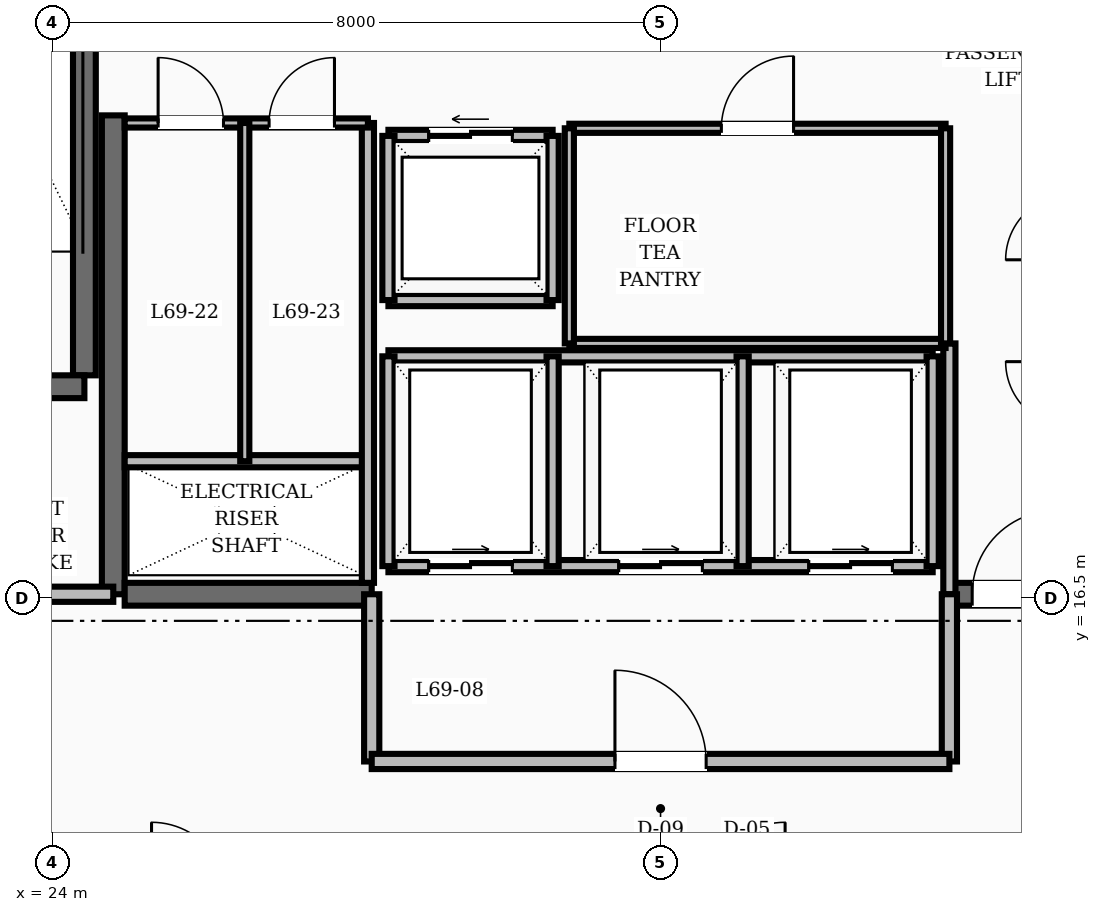
"""IFC4 building model, lengths in metres.
Left out: names, types, materials, properties, quantities, classifications, styles, units other than length and angle.
Written with IfcOpenShell. Run it as: python <this file> out.ifc"""

import sys

from ifc_helpers import new_model, si_unit, direction, frame, frame_2d, origin, place, context, subcontext, project, spatial, rectangle, extrude, element, fill, save


model = new_model("IFC4")
c1 = context("Model", 3, precision=1e-05, world=origin(), true_north=direction((0.0, 1.0)))
c2 = subcontext(c1, "Body", "Model", "MODEL_VIEW")
j1 = project(units=[si_unit("LENGTHUNIT", "METRE"), si_unit("PLANEANGLEUNIT", "RADIAN")], contexts=[c1])
p1 = place(None, origin())
s1 = spatial("IfcSite", under=j1, at=p1, CompositionType="ELEMENT")
p2 = place(p1, origin())
s2 = spatial("IfcBuilding", under=s1, at=p2, CompositionType="ELEMENT")
p3 = place(p2, frame((0.0, 0.0, 265.2)))
s3 = spatial("IfcBuildingStorey", under=s2, at=p3, CompositionType="ELEMENT", Elevation=265.2)
p4 = place(p3, frame((24.8, 16.55, 0.0), z_axis=(0.0, 0.0, 1.0), x_axis=(0.0, 1.0, 0.0)))
e1 = element("IfcWall", 1, at=p4, inside=s3, PredefinedType="SHEAR", context=c2, shape_type="SweptSolid", body=[
    extrude(rectangle(XDim=6.3, YDim=0.3, at=frame_2d((3.15, 0.0))), origin(), (0.0, 0.0, 1.0), 3.6),
])
p5 = place(p3, frame((24.95, 16.55, 0.0), z_axis=(0.0, 0.0, 1.0), x_axis=(1.0, 0.0, 0.0)))
e2 = element("IfcWall", 2, at=p5, inside=s3, PredefinedType="SHEAR", context=c2, shape_type="SweptSolid", body=[
    extrude(rectangle(XDim=3.25, YDim=0.3, at=frame_2d((1.625, 0.0))), origin(), (0.0, 0.0, 1.0), 3.6),
])
p6 = place(p3, frame((35.8, 16.55, 0.0), z_axis=(0.0, 0.0, 1.0), x_axis=(1.0, 0.0, 0.0)))
e3 = element("IfcWall", 3, at=p6, inside=s3, PredefinedType="SHEAR", context=c2, shape_type="SweptSolid", body=[
    extrude(rectangle(XDim=3.25, YDim=0.3, at=frame_2d((1.625, 0.0))), origin(), (0.0, 0.0, 1.0), 3.6),
])
p7 = place(p6, frame((0.3, 0.0, 0.0)))
e4 = element("IfcOpeningElement", 4, at=p7, cuts=e3, PredefinedType="OPENING", context=c2, shape_type="SweptSolid", body=[
    extrude(rectangle(XDim=1.1, YDim=2.1, at=frame_2d((0.55, 1.05))), frame((0.0, 0.16, 0.0), z_axis=(0.0, -1.0, 0.0), x_axis=(1.0, 0.0, 0.0)), (0.0, 0.0, 1.0), 0.32),
])
p8 = place(p3, frame((24.42, 19.43, 0.0), z_axis=(0.0, 0.0, 1.0), x_axis=(0.0, 1.0, 0.0)))
e5 = element("IfcWall", 5, at=p8, inside=s3, PredefinedType="SHEAR", context=c2, shape_type="SweptSolid", body=[
    extrude(rectangle(XDim=8.74, YDim=0.3, at=frame_2d((4.37, 0.0))), origin(), (0.0, 0.0, 1.0), 3.6),
])
p9 = place(p3, frame((20.82, 19.28, 0.0), z_axis=(0.0, 0.0, 1.0), x_axis=(1.0, 0.0, 0.0)))
e6 = element("IfcWall", 6, at=p9, inside=s3, PredefinedType="SHEAR", context=c2, shape_type="SweptSolid", body=[
    extrude(rectangle(XDim=3.6, YDim=0.3, at=frame_2d((1.8, 0.0))), origin(), (0.0, 0.0, 1.0), 3.6),
])
p10 = place(p9, frame((1.3, 0.0, 0.0)))
e7 = element("IfcOpeningElement", 7, at=p10, cuts=e6, PredefinedType="OPENING", context=c2, shape_type="SweptSolid", body=[
    extrude(rectangle(XDim=1.1, YDim=2.1, at=frame_2d((0.55, 1.05))), frame((0.0, 0.16, 0.0), z_axis=(0.0, -1.0, 0.0), x_axis=(1.0, 0.0, 0.0)), (0.0, 0.0, 1.0), 0.32),
])
p11 = place(p3, frame((20.82, 16.55, 0.0), z_axis=(0.0, 0.0, 1.0), x_axis=(1.0, 0.0, 0.0)))
e8 = element("IfcWall", 8, at=p11, inside=s3, PredefinedType="SOLIDWALL", context=c2, shape_type="SweptSolid", body=[
    extrude(rectangle(XDim=3.98, YDim=0.2, at=frame_2d((1.99, 0.0))), origin(), (0.0, 0.0, 1.0), 2.87),
])
p12 = place(p3, frame((35.8, 16.55, 0.0), z_axis=(0.0, 0.0, 1.0), x_axis=(0.0, 1.0, 0.0)))
e9 = element("IfcWall", 9, at=p12, inside=s3, PredefinedType="SOLIDWALL", context=c2, shape_type="SweptSolid", body=[
    extrude(rectangle(XDim=3.3, YDim=0.16, at=frame_2d((1.65, 0.0))), origin(), (0.0, 0.0, 1.0), 2.87),
])
for number, where, z_axis, x_axis in (
    (10, (28.2, 14.35, 0.0), (0.0, 0.0, 1.0), (0.0, 1.0, 0.0)),
    (11, (35.8, 14.35, 0.0), (0.0, 0.0, 1.0), (0.0, 1.0, 0.0)),
):
    element("IfcWall", number, at=place(p3, frame(where, z_axis=z_axis, x_axis=x_axis)), inside=s3, PredefinedType="SOLIDWALL", context=c2, shape_type="SweptSolid", body=[
        extrude(rectangle(XDim=2.2, YDim=0.2, at=frame_2d((1.1, 0.0))), origin(), (0.0, 0.0, 1.0), 2.87),
    ])
p13 = place(p3, frame((28.2, 14.35, 0.0), z_axis=(0.0, 0.0, 1.0), x_axis=(1.0, 0.0, 0.0)))
e12 = element("IfcWall", 12, at=p13, inside=s3, PredefinedType="SOLIDWALL", context=c2, shape_type="SweptSolid", body=[
    extrude(rectangle(XDim=7.6, YDim=0.2, at=frame_2d((3.8, 0.0))), origin(), (0.0, 0.0, 1.0), 2.87),
])
p14 = place(p13, frame((3.2, 0.0, 0.0)))
e13 = element("IfcOpeningElement", 13, at=p14, cuts=e12, PredefinedType="OPENING", context=c2, shape_type="SweptSolid", body=[
    extrude(rectangle(XDim=1.2, YDim=2.1, at=frame_2d((0.6, 1.05))), frame((0.0, 0.11, 0.0), z_axis=(0.0, -1.0, 0.0), x_axis=(1.0, 0.0, 0.0)), (0.0, 0.0, 1.0), 0.22),
])
p15 = place(p3, frame((28.42, 22.58, 0.0), z_axis=(0.0, 0.0, 1.0), x_axis=(1.0, 0.0, 0.0)))
e14 = element("IfcWall", 14, at=p15, inside=s3, PredefinedType="SOLIDWALL", context=c2, shape_type="SweptSolid", body=[
    extrude(rectangle(XDim=2.16, YDim=0.16, at=frame_2d((1.08, 0.0))), origin(), (0.0, 0.0, 1.0), 2.87),
])
p16 = place(p15, frame((0.53, 0.0, 0.0)))
e15 = element("IfcOpeningElement", 15, at=p16, cuts=e14, PredefinedType="OPENING", context=c2, shape_type="SweptSolid", body=[
    extrude(rectangle(XDim=1.1, YDim=2.15, at=frame_2d((0.55, 1.075))), frame((0.0, 0.09, 0.0), z_axis=(0.0, -1.0, 0.0), x_axis=(1.0, 0.0, 0.0)), (0.0, 0.0, 1.0), 0.18),
])
for number, where, z_axis, x_axis in (
    (16, (28.42, 20.42, 0.0), (0.0, 0.0, 1.0), (1.0, 0.0, 0.0)),
    (17, (28.42, 20.42, 0.0), (0.0, 0.0, 1.0), (0.0, 1.0, 0.0)),
    (18, (30.58, 20.42, 0.0), (0.0, 0.0, 1.0), (0.0, 1.0, 0.0)),
):
    element("IfcWall", number, at=place(p3, frame(where, z_axis=z_axis, x_axis=x_axis)), inside=s3, PredefinedType="SOLIDWALL", context=c2, shape_type="SweptSolid", body=[
        extrude(rectangle(XDim=2.16, YDim=0.16, at=frame_2d((1.08, 0.0))), origin(), (0.0, 0.0, 1.0), 2.87),
    ])
p17 = place(p3, frame((28.42, 16.92, 0.0), z_axis=(0.0, 0.0, 1.0), x_axis=(1.0, 0.0, 0.0)))
e19 = element("IfcWall", 19, at=p17, inside=s3, PredefinedType="SOLIDWALL", context=c2, shape_type="SweptSolid", body=[
    extrude(rectangle(XDim=7.16, YDim=0.16, at=frame_2d((3.58, 0.0))), origin(), (0.0, 0.0, 1.0), 2.87),
])
p18 = place(p17, frame((0.53, 0.0, 0.0)))
e20 = element("IfcOpeningElement", 20, at=p18, cuts=e19, PredefinedType="OPENING", context=c2, shape_type="SweptSolid", body=[
    extrude(rectangle(XDim=1.1, YDim=2.15, at=frame_2d((0.55, 1.075))), frame((0.0, 0.09, 0.0), z_axis=(0.0, -1.0, 0.0), x_axis=(1.0, 0.0, 0.0)), (0.0, 0.0, 1.0), 0.18),
])
p19 = place(p17, frame((3.03, 0.0, 0.0)))
e21 = element("IfcOpeningElement", 21, at=p19, cuts=e19, PredefinedType="OPENING", context=c2, shape_type="SweptSolid", body=[
    extrude(rectangle(XDim=1.1, YDim=2.15, at=frame_2d((0.55, 1.075))), frame((0.0, 0.09, 0.0), z_axis=(0.0, -1.0, 0.0), x_axis=(1.0, 0.0, 0.0)), (0.0, 0.0, 1.0), 0.18),
])
p20 = place(p17, frame((5.53, 0.0, 0.0)))
e22 = element("IfcOpeningElement", 22, at=p20, cuts=e19, PredefinedType="OPENING", context=c2, shape_type="SweptSolid", body=[
    extrude(rectangle(XDim=1.1, YDim=2.15, at=frame_2d((0.55, 1.075))), frame((0.0, 0.09, 0.0), z_axis=(0.0, -1.0, 0.0), x_axis=(1.0, 0.0, 0.0)), (0.0, 0.0, 1.0), 0.18),
])
p21 = place(p3, frame((28.42, 19.68, 0.0), z_axis=(0.0, 0.0, 1.0), x_axis=(1.0, 0.0, 0.0)))
e23 = element("IfcWall", 23, at=p21, inside=s3, PredefinedType="SOLIDWALL", context=c2, shape_type="SweptSolid", body=[
    extrude(rectangle(XDim=7.16, YDim=0.16, at=frame_2d((3.58, 0.0))), origin(), (0.0, 0.0, 1.0), 2.87),
])
for number, where, z_axis, x_axis in (
    (24, (28.42, 16.92, 0.0), (0.0, 0.0, 1.0), (0.0, 1.0, 0.0)),
    (25, (30.58, 16.92, 0.0), (0.0, 0.0, 1.0), (0.0, 1.0, 0.0)),
    (26, (33.08, 16.92, 0.0), (0.0, 0.0, 1.0), (0.0, 1.0, 0.0)),
    (27, (35.58, 16.92, 0.0), (0.0, 0.0, 1.0), (0.0, 1.0, 0.0)),
):
    element("IfcWall", number, at=place(p3, frame(where, z_axis=z_axis, x_axis=x_axis)), inside=s3, PredefinedType="SOLIDWALL", context=c2, shape_type="SweptSolid", body=[
        extrude(rectangle(XDim=2.76, YDim=0.16, at=frame_2d((1.38, 0.0))), origin(), (0.0, 0.0, 1.0), 2.87),
    ])
p22 = place(p3, frame((30.8, 22.68, 0.0), z_axis=(0.0, 0.0, 1.0), x_axis=(1.0, 0.0, 0.0)))
e28 = element("IfcWall", 28, at=p22, inside=s3, PredefinedType="PARTITIONING", context=c2, shape_type="SweptSolid", body=[
    extrude(rectangle(XDim=4.95, YDim=0.12, at=frame_2d((2.475, 0.0))), origin(), (0.0, 0.0, 1.0), 2.87),
])
p23 = place(p22, frame((2.0, 0.0, 0.0)))
e29 = element("IfcOpeningElement", 29, at=p23, cuts=e28, PredefinedType="OPENING", context=c2, shape_type="SweptSolid", body=[
    extrude(rectangle(XDim=0.95, YDim=2.1, at=frame_2d((0.475, 1.05))), frame((0.0, 0.07, 0.0), z_axis=(0.0, -1.0, 0.0), x_axis=(1.0, 0.0, 0.0)), (0.0, 0.0, 1.0), 0.14),
])
p24 = place(p3, frame((30.8, 19.85, 0.0), z_axis=(0.0, 0.0, 1.0), x_axis=(1.0, 0.0, 0.0)))
e30 = element("IfcWall", 30, at=p24, inside=s3, PredefinedType="PARTITIONING", context=c2, shape_type="SweptSolid", body=[
    extrude(rectangle(XDim=4.95, YDim=0.12, at=frame_2d((2.475, 0.0))), origin(), (0.0, 0.0, 1.0), 2.87),
])
for number, where, z_axis, x_axis in (
    (31, (30.8, 19.85, 0.0), (0.0, 0.0, 1.0), (0.0, 1.0, 0.0)),
    (32, (35.75, 19.85, 0.0), (0.0, 0.0, 1.0), (0.0, 1.0, 0.0)),
):
    element("IfcWall", number, at=place(p3, frame(where, z_axis=z_axis, x_axis=x_axis)), inside=s3, PredefinedType="PARTITIONING", context=c2, shape_type="SweptSolid", body=[
        extrude(rectangle(XDim=2.83, YDim=0.12, at=frame_2d((1.415, 0.0))), origin(), (0.0, 0.0, 1.0), 2.87),
    ])
p25 = place(p3, frame((24.95, 18.3, 0.0), z_axis=(0.0, 0.0, 1.0), x_axis=(1.0, 0.0, 0.0)))
e33 = element("IfcWall", 33, at=p25, inside=s3, PredefinedType="SOLIDWALL", context=c2, shape_type="SweptSolid", body=[
    extrude(rectangle(XDim=3.2, YDim=0.16, at=frame_2d((1.6, 0.0))), origin(), (0.0, 0.0, 1.0), 2.87),
])
p26 = place(p3, frame((28.15, 16.7, 0.0), z_axis=(0.0, 0.0, 1.0), x_axis=(0.0, 1.0, 0.0)))
e34 = element("IfcWall", 34, at=p26, inside=s3, PredefinedType="SOLIDWALL", context=c2, shape_type="SweptSolid", body=[
    extrude(rectangle(XDim=6.05, YDim=0.16, at=frame_2d((3.025, 0.0))), origin(), (0.0, 0.0, 1.0), 2.87),
])
p27 = place(p3, frame((24.95, 22.75, 0.0), z_axis=(0.0, 0.0, 1.0), x_axis=(1.0, 0.0, 0.0)))
e35 = element("IfcWall", 35, at=p27, inside=s3, PredefinedType="PARTITIONING", context=c2, shape_type="SweptSolid", body=[
    extrude(rectangle(XDim=3.2, YDim=0.12, at=frame_2d((1.6, 0.0))), origin(), (0.0, 0.0, 1.0), 2.87),
])
p28 = place(p27, frame((0.44, 0.0, 0.0)))
e36 = element("IfcOpeningElement", 36, at=p28, cuts=e35, PredefinedType="OPENING", context=c2, shape_type="SweptSolid", body=[
    extrude(rectangle(XDim=0.86, YDim=2.1, at=frame_2d((0.43, 1.05))), frame((0.0, 0.07, 0.0), z_axis=(0.0, -1.0, 0.0), x_axis=(1.0, 0.0, 0.0)), (0.0, 0.0, 1.0), 0.14),
])
p29 = place(p27, frame((1.9, 0.0, 0.0)))
e37 = element("IfcOpeningElement", 37, at=p29, cuts=e35, PredefinedType="OPENING", context=c2, shape_type="SweptSolid", body=[
    extrude(rectangle(XDim=0.86, YDim=2.1, at=frame_2d((0.43, 1.05))), frame((0.0, 0.07, 0.0), z_axis=(0.0, -1.0, 0.0), x_axis=(1.0, 0.0, 0.0)), (0.0, 0.0, 1.0), 0.14),
])
p30 = place(p3, frame((26.53, 18.3, 0.0), z_axis=(0.0, 0.0, 1.0), x_axis=(0.0, 1.0, 0.0)))
e38 = element("IfcWall", 38, at=p30, inside=s3, PredefinedType="PARTITIONING", context=c2, shape_type="SweptSolid", body=[
    extrude(rectangle(XDim=4.45, YDim=0.12, at=frame_2d((2.225, 0.0))), origin(), (0.0, 0.0, 1.0), 2.87),
])
p31 = place(p3, frame((21.635, 13.635, 0.0), z_axis=(0.0, 0.0, 1.0), x_axis=(0.92856882165, -0.371160266542, 0.0)))
e39 = element("IfcWall", 39, at=p31, inside=s3, PredefinedType="SOLIDWALL", context=c2, shape_type="SweptSolid", body=[
    extrude(rectangle(XDim=2.923, YDim=0.16, at=frame_2d((1.461, 0.0))), origin(), (0.0, 0.0, 1.0), 2.87),
])
p32 = place(p7, origin())
e40 = element("IfcDoor", 40, at=p32, inside=s3, OperationType="SINGLE_SWING_RIGHT", PredefinedType="DOOR", context=c2, shape_type="SweptSolid", body=[
    extrude(rectangle(XDim=1.1, YDim=2.1, at=frame_2d((0.55, 1.05))), frame((0.0, 0.025, 0.0), z_axis=(0.0, -1.0, 0.0), x_axis=(1.0, 0.0, 0.0)), (0.0, 0.0, 1.0), 0.05),
])
fill(e4, e40)
p33 = place(p14, origin())
e41 = element("IfcDoor", 41, at=p33, inside=s3, OperationType="SINGLE_SWING_LEFT", PredefinedType="DOOR", context=c2, shape_type="SweptSolid", body=[
    extrude(rectangle(XDim=1.2, YDim=2.1, at=frame_2d((0.6, 1.05))), frame((0.0, 0.025, 0.0), z_axis=(0.0, -1.0, 0.0), x_axis=(1.0, 0.0, 0.0)), (0.0, 0.0, 1.0), 0.05),
])
fill(e13, e41)
p34 = place(p16, origin())
e42 = element("IfcDoor", 42, at=p34, inside=s3, OperationType="SLIDING_TO_LEFT", PredefinedType="DOOR", context=c2, shape_type="SweptSolid", body=[
    extrude(rectangle(XDim=1.1, YDim=2.15, at=frame_2d((0.55, 1.075))), frame((0.0, 0.025, 0.0), z_axis=(0.0, -1.0, 0.0), x_axis=(1.0, 0.0, 0.0)), (0.0, 0.0, 1.0), 0.05),
])
fill(e15, e42)
p35 = place(p18, origin())
e43 = element("IfcDoor", 43, at=p35, inside=s3, OperationType="SLIDING_TO_RIGHT", PredefinedType="DOOR", context=c2, shape_type="SweptSolid", body=[
    extrude(rectangle(XDim=1.1, YDim=2.15, at=frame_2d((0.55, 1.075))), frame((0.0, 0.025, 0.0), z_axis=(0.0, -1.0, 0.0), x_axis=(1.0, 0.0, 0.0)), (0.0, 0.0, 1.0), 0.05),
])
fill(e20, e43)
p36 = place(p19, origin())
e44 = element("IfcDoor", 44, at=p36, inside=s3, OperationType="SLIDING_TO_RIGHT", PredefinedType="DOOR", context=c2, shape_type="SweptSolid", body=[
    extrude(rectangle(XDim=1.1, YDim=2.15, at=frame_2d((0.55, 1.075))), frame((0.0, 0.025, 0.0), z_axis=(0.0, -1.0, 0.0), x_axis=(1.0, 0.0, 0.0)), (0.0, 0.0, 1.0), 0.05),
])
fill(e21, e44)
p37 = place(p20, origin())
e45 = element("IfcDoor", 45, at=p37, inside=s3, OperationType="SLIDING_TO_RIGHT", PredefinedType="DOOR", context=c2, shape_type="SweptSolid", body=[
    extrude(rectangle(XDim=1.1, YDim=2.15, at=frame_2d((0.55, 1.075))), frame((0.0, 0.025, 0.0), z_axis=(0.0, -1.0, 0.0), x_axis=(1.0, 0.0, 0.0)), (0.0, 0.0, 1.0), 0.05),
])
fill(e22, e45)
p38 = place(p23, origin())
e46 = element("IfcDoor", 46, at=p38, inside=s3, OperationType="SINGLE_SWING_RIGHT", PredefinedType="DOOR", context=c2, shape_type="SweptSolid", body=[
    extrude(rectangle(XDim=0.95, YDim=2.1, at=frame_2d((0.475, 1.05))), frame((0.0, 0.025, 0.0), z_axis=(0.0, -1.0, 0.0), x_axis=(1.0, 0.0, 0.0)), (0.0, 0.0, 1.0), 0.05),
])
fill(e29, e46)
p39 = place(p28, origin())
e47 = element("IfcDoor", 47, at=p39, inside=s3, OperationType="SINGLE_SWING_LEFT", PredefinedType="DOOR", context=c2, shape_type="SweptSolid", body=[
    extrude(rectangle(XDim=0.86, YDim=2.1, at=frame_2d((0.43, 1.05))), frame((0.0, 0.025, 0.0), z_axis=(0.0, -1.0, 0.0), x_axis=(1.0, 0.0, 0.0)), (0.0, 0.0, 1.0), 0.05),
])
fill(e36, e47)
p40 = place(p29, origin())
e48 = element("IfcDoor", 48, at=p40, inside=s3, OperationType="SINGLE_SWING_RIGHT", PredefinedType="DOOR", context=c2, shape_type="SweptSolid", body=[
    extrude(rectangle(XDim=0.86, YDim=2.1, at=frame_2d((0.43, 1.05))), frame((0.0, 0.025, 0.0), z_axis=(0.0, -1.0, 0.0), x_axis=(1.0, 0.0, 0.0)), (0.0, 0.0, 1.0), 0.05),
])
fill(e37, e48)
save(model, sys.argv[1])
